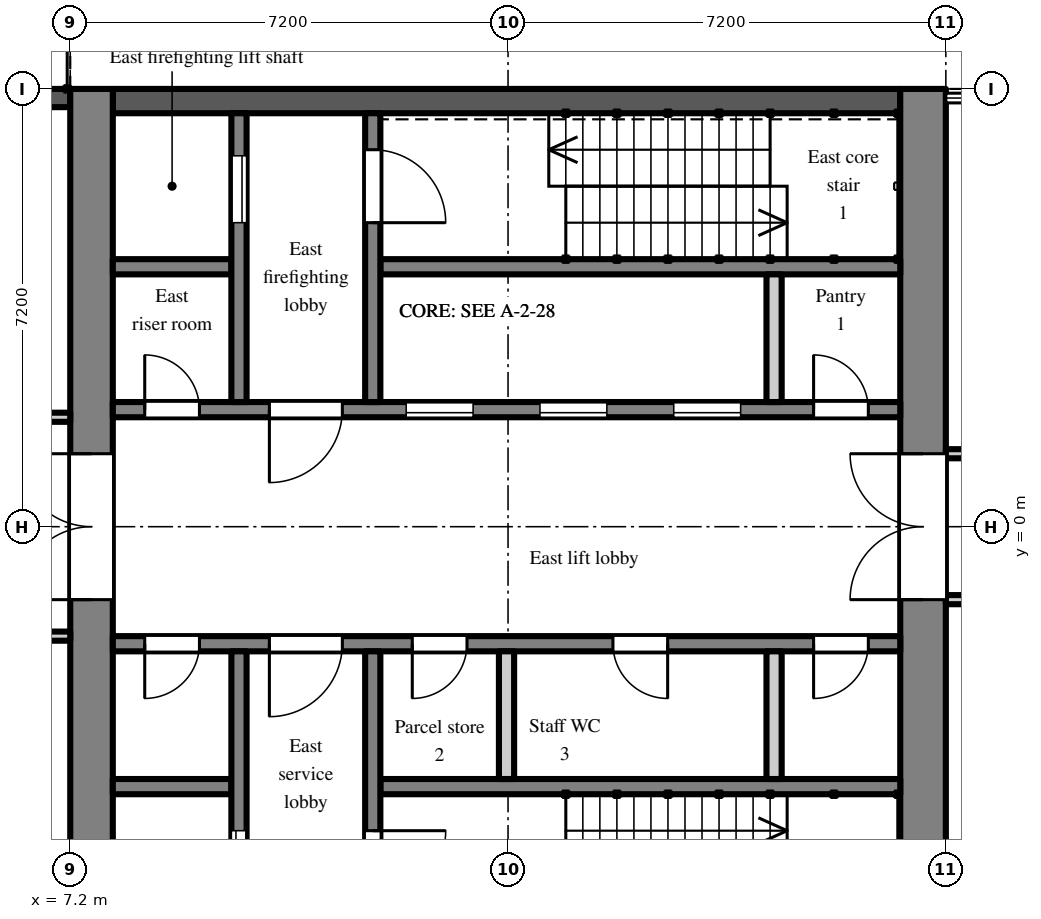
"""IFC4 building model, lengths in metres.
Left out: names, types, materials, properties, quantities, classifications, styles, units other than length and angle.
Written with IfcOpenShell. Run it as: python <this file> out.ifc"""

import sys

from ifc_helpers import new_model, si_unit, direction, frame, frame_2d, origin, place, context, subcontext, project, spatial, rectangle, extrude, element, fill, save


model = new_model("IFC4")
c1 = context("Model", 3, precision=1e-05, world=origin(), true_north=direction((0.0, 1.0)))
c2 = subcontext(c1, "Body", "Model", "MODEL_VIEW")
j1 = project(units=[si_unit("LENGTHUNIT", "METRE"), si_unit("PLANEANGLEUNIT", "RADIAN")], contexts=[c1])
p1 = place(None, origin())
s1 = spatial("IfcSite", under=j1, at=p1, CompositionType="ELEMENT")
p2 = place(p1, origin())
s2 = spatial("IfcBuilding", under=s1, at=p2, CompositionType="ELEMENT")
p3 = place(p2, frame((0.0, 0.0, 166.5)))
s3 = spatial("IfcBuildingStorey", under=s2, at=p3, CompositionType="ELEMENT", Elevation=166.5)
p4 = place(p3, frame((7.2, 7.05, 0.0), z_axis=(0.0, 0.0, 1.0), x_axis=(-1.0, 0.0, 0.0)))
e1 = element("IfcWall", 1, at=p4, inside=s3, PredefinedType="SOLIDWALL", context=c2, shape_type="SweptSolid", body=[
    extrude(rectangle(XDim=3.0, YDim=0.3, at=frame_2d((1.5, 0.0))), origin(), (0.0, 0.0, 1.0), 3.4),
])
p5 = place(p3, frame((7.55, -7.2, 0.0), z_axis=(0.0, 0.0, 1.0), x_axis=(0.0, 1.0, 0.0)))
e2 = element("IfcWall", 2, at=p5, inside=s3, PredefinedType="SHEAR", context=c2, shape_type="SweptSolid", body=[
    extrude(rectangle(XDim=14.4, YDim=0.7, at=frame_2d((7.2, 0.0))), origin(), (0.0, 0.0, 1.0), 3.8),
])
p6 = place(p5, frame((6.0, 0.0, 0.0)))
e3 = element("IfcOpeningElement", 3, at=p6, cuts=e2, PredefinedType="OPENING", context=c2, shape_type="SweptSolid", body=[
    extrude(rectangle(XDim=2.4, YDim=2.2, at=frame_2d((1.2, 1.1))), frame((0.0, 0.36, 0.0), z_axis=(0.0, -1.0, 0.0), x_axis=(1.0, 0.0, 0.0)), (0.0, 0.0, 1.0), 0.72),
])
p7 = place(p3, frame((21.225, -7.2, 0.0), z_axis=(0.0, 0.0, 1.0), x_axis=(0.0, 1.0, 0.0)))
e4 = element("IfcWall", 4, at=p7, inside=s3, PredefinedType="SHEAR", context=c2, shape_type="SweptSolid", body=[
    extrude(rectangle(XDim=14.4, YDim=0.75, at=frame_2d((7.2, 0.0))), origin(), (0.0, 0.0, 1.0), 3.8),
])
p8 = place(p7, frame((6.0, 0.0, 0.0)))
e5 = element("IfcOpeningElement", 5, at=p8, cuts=e4, PredefinedType="OPENING", context=c2, shape_type="SweptSolid", body=[
    extrude(rectangle(XDim=2.4, YDim=2.2, at=frame_2d((1.2, 1.1))), frame((0.0, 0.385, 0.0), z_axis=(0.0, -1.0, 0.0), x_axis=(1.0, 0.0, 0.0)), (0.0, 0.0, 1.0), 0.77),
])
p9 = place(p3, frame((7.9, 7.0, 0.0), z_axis=(0.0, 0.0, 1.0), x_axis=(1.0, 0.0, 0.0)))
e6 = element("IfcWall", 6, at=p9, inside=s3, PredefinedType="SHEAR", context=c2, shape_type="SweptSolid", body=[
    extrude(rectangle(XDim=12.95, YDim=0.4, at=frame_2d((6.475, 0.0))), origin(), (0.0, 0.0, 1.0), 3.8),
])
p10 = place(p3, frame((7.9, 1.925, 0.0), z_axis=(0.0, 0.0, 1.0), x_axis=(1.0, 0.0, 0.0)))
e7 = element("IfcWall", 7, at=p10, inside=s3, PredefinedType="SHEAR", context=c2, shape_type="SweptSolid", body=[
    extrude(rectangle(XDim=12.95, YDim=0.25, at=frame_2d((6.475, 0.0))), origin(), (0.0, 0.0, 1.0), 3.8),
])
p11 = place(p10, frame((4.825, 0.0, 0.0)))
e8 = element("IfcOpeningElement", 8, at=p11, cuts=e7, PredefinedType="OPENING", context=c2, shape_type="SweptSolid", body=[
    extrude(rectangle(XDim=1.1, YDim=2.1, at=frame_2d((0.55, 1.05))), frame((0.0, 0.135, 0.0), z_axis=(0.0, -1.0, 0.0), x_axis=(1.0, 0.0, 0.0)), (0.0, 0.0, 1.0), 0.27),
])
p12 = place(p10, frame((7.025, 0.0, 0.0)))
e9 = element("IfcOpeningElement", 9, at=p12, cuts=e7, PredefinedType="OPENING", context=c2, shape_type="SweptSolid", body=[
    extrude(rectangle(XDim=1.1, YDim=2.1, at=frame_2d((0.55, 1.05))), frame((0.0, 0.135, 0.0), z_axis=(0.0, -1.0, 0.0), x_axis=(1.0, 0.0, 0.0)), (0.0, 0.0, 1.0), 0.27),
])
p13 = place(p10, frame((9.225, 0.0, 0.0)))
e10 = element("IfcOpeningElement", 10, at=p13, cuts=e7, PredefinedType="OPENING", context=c2, shape_type="SweptSolid", body=[
    extrude(rectangle(XDim=1.1, YDim=2.1, at=frame_2d((0.55, 1.05))), frame((0.0, 0.135, 0.0), z_axis=(0.0, -1.0, 0.0), x_axis=(1.0, 0.0, 0.0)), (0.0, 0.0, 1.0), 0.27),
])
p14 = place(p10, frame((0.525, 0.0, 0.0)))
e11 = element("IfcOpeningElement", 11, at=p14, cuts=e7, PredefinedType="OPENING", context=c2, shape_type="SweptSolid", body=[
    extrude(rectangle(XDim=0.9, YDim=2.1, at=frame_2d((0.45, 1.05))), frame((0.0, 0.135, 0.0), z_axis=(0.0, -1.0, 0.0), x_axis=(1.0, 0.0, 0.0)), (0.0, 0.0, 1.0), 0.27),
])
p15 = place(p10, frame((2.575, 0.0, 0.0)))
e12 = element("IfcOpeningElement", 12, at=p15, cuts=e7, PredefinedType="OPENING", context=c2, shape_type="SweptSolid", body=[
    extrude(rectangle(XDim=1.2, YDim=2.1, at=frame_2d((0.6, 1.05))), frame((0.0, 0.135, 0.0), z_axis=(0.0, -1.0, 0.0), x_axis=(1.0, 0.0, 0.0)), (0.0, 0.0, 1.0), 0.27),
])
p16 = place(p10, frame((11.525, 0.0, 0.0)))
e13 = element("IfcOpeningElement", 13, at=p16, cuts=e7, PredefinedType="OPENING", context=c2, shape_type="SweptSolid", body=[
    extrude(rectangle(XDim=0.9, YDim=2.1, at=frame_2d((0.45, 1.05))), frame((0.0, 0.135, 0.0), z_axis=(0.0, -1.0, 0.0), x_axis=(1.0, 0.0, 0.0)), (0.0, 0.0, 1.0), 0.27),
])
p17 = place(p3, frame((7.9, 4.275, 0.0), z_axis=(0.0, 0.0, 1.0), x_axis=(1.0, 0.0, 0.0)))
e14 = element("IfcWall", 14, at=p17, inside=s3, PredefinedType="SHEAR", context=c2, shape_type="SweptSolid", body=[
    extrude(rectangle(XDim=1.95, YDim=0.25, at=frame_2d((0.975, 0.0))), origin(), (0.0, 0.0, 1.0), 3.8),
])
p18 = place(p3, frame((12.3, 4.275, 0.0), z_axis=(0.0, 0.0, 1.0), x_axis=(1.0, 0.0, 0.0)))
e15 = element("IfcWall", 15, at=p18, inside=s3, PredefinedType="SHEAR", context=c2, shape_type="SweptSolid", body=[
    extrude(rectangle(XDim=8.55, YDim=0.25, at=frame_2d((4.275, 0.0))), origin(), (0.0, 0.0, 1.0), 3.8),
])
p19 = place(p3, frame((9.975, 2.05, 0.0), z_axis=(0.0, 0.0, 1.0), x_axis=(0.0, 1.0, 0.0)))
e16 = element("IfcWall", 16, at=p19, inside=s3, PredefinedType="SHEAR", context=c2, shape_type="SweptSolid", body=[
    extrude(rectangle(XDim=4.75, YDim=0.25, at=frame_2d((2.375, 0.0))), origin(), (0.0, 0.0, 1.0), 3.8),
])
p20 = place(p19, frame((2.95, 0.0, 0.0)))
e17 = element("IfcOpeningElement", 17, at=p20, cuts=e16, PredefinedType="OPENING", context=c2, shape_type="SweptSolid", body=[
    extrude(rectangle(XDim=1.1, YDim=2.1, at=frame_2d((0.55, 1.05))), frame((0.0, 0.135, 0.0), z_axis=(0.0, -1.0, 0.0), x_axis=(1.0, 0.0, 0.0)), (0.0, 0.0, 1.0), 0.27),
])
p21 = place(p3, frame((12.175, 2.05, 0.0), z_axis=(0.0, 0.0, 1.0), x_axis=(0.0, 1.0, 0.0)))
e18 = element("IfcWall", 18, at=p21, inside=s3, PredefinedType="SHEAR", context=c2, shape_type="SweptSolid", body=[
    extrude(rectangle(XDim=4.75, YDim=0.25, at=frame_2d((2.375, 0.0))), origin(), (0.0, 0.0, 1.0), 3.8),
])
p22 = place(p21, frame((2.95, 0.0, 0.0)))
e19 = element("IfcOpeningElement", 19, at=p22, cuts=e18, PredefinedType="OPENING", context=c2, shape_type="SweptSolid", body=[
    extrude(rectangle(XDim=1.2, YDim=2.1, at=frame_2d((0.6, 1.05))), frame((0.0, 0.135, 0.0), z_axis=(0.0, -1.0, 0.0), x_axis=(1.0, 0.0, 0.0)), (0.0, 0.0, 1.0), 0.27),
])
p23 = place(p3, frame((18.775, 2.05, 0.0), z_axis=(0.0, 0.0, 1.0), x_axis=(0.0, 1.0, 0.0)))
e20 = element("IfcWall", 20, at=p23, inside=s3, PredefinedType="PARTITIONING", context=c2, shape_type="SweptSolid", body=[
    extrude(rectangle(XDim=2.1, YDim=0.25, at=frame_2d((1.05, 0.0))), origin(), (0.0, 0.0, 1.0), 3.8),
])
p24 = place(p3, frame((7.9, -1.925, 0.0), z_axis=(0.0, 0.0, 1.0), x_axis=(1.0, 0.0, 0.0)))
e21 = element("IfcWall", 21, at=p24, inside=s3, PredefinedType="SHEAR", context=c2, shape_type="SweptSolid", body=[
    extrude(rectangle(XDim=12.95, YDim=0.25, at=frame_2d((6.475, 0.0))), origin(), (0.0, 0.0, 1.0), 3.8),
])
p25 = place(p24, frame((0.525, 0.0, 0.0)))
e22 = element("IfcOpeningElement", 22, at=p25, cuts=e21, PredefinedType="OPENING", context=c2, shape_type="SweptSolid", body=[
    extrude(rectangle(XDim=0.9, YDim=2.1, at=frame_2d((0.45, 1.05))), frame((0.0, 0.135, 0.0), z_axis=(0.0, -1.0, 0.0), x_axis=(1.0, 0.0, 0.0)), (0.0, 0.0, 1.0), 0.27),
])
p26 = place(p24, frame((2.575, 0.0, 0.0)))
e23 = element("IfcOpeningElement", 23, at=p26, cuts=e21, PredefinedType="OPENING", context=c2, shape_type="SweptSolid", body=[
    extrude(rectangle(XDim=1.2, YDim=2.1, at=frame_2d((0.6, 1.05))), frame((0.0, 0.135, 0.0), z_axis=(0.0, -1.0, 0.0), x_axis=(1.0, 0.0, 0.0)), (0.0, 0.0, 1.0), 0.27),
])
p27 = place(p24, frame((4.925, 0.0, 0.0)))
e24 = element("IfcOpeningElement", 24, at=p27, cuts=e21, PredefinedType="OPENING", context=c2, shape_type="SweptSolid", body=[
    extrude(rectangle(XDim=0.9, YDim=2.1, at=frame_2d((0.45, 1.05))), frame((0.0, 0.135, 0.0), z_axis=(0.0, -1.0, 0.0), x_axis=(1.0, 0.0, 0.0)), (0.0, 0.0, 1.0), 0.27),
])
p28 = place(p24, frame((8.225, 0.0, 0.0)))
e25 = element("IfcOpeningElement", 25, at=p28, cuts=e21, PredefinedType="OPENING", context=c2, shape_type="SweptSolid", body=[
    extrude(rectangle(XDim=0.9, YDim=2.1, at=frame_2d((0.45, 1.05))), frame((0.0, 0.135, 0.0), z_axis=(0.0, -1.0, 0.0), x_axis=(1.0, 0.0, 0.0)), (0.0, 0.0, 1.0), 0.27),
])
p29 = place(p24, frame((11.525, 0.0, 0.0)))
e26 = element("IfcOpeningElement", 26, at=p29, cuts=e21, PredefinedType="OPENING", context=c2, shape_type="SweptSolid", body=[
    extrude(rectangle(XDim=0.9, YDim=2.1, at=frame_2d((0.45, 1.05))), frame((0.0, 0.135, 0.0), z_axis=(0.0, -1.0, 0.0), x_axis=(1.0, 0.0, 0.0)), (0.0, 0.0, 1.0), 0.27),
])
p30 = place(p3, frame((7.9, -4.275, 0.0), z_axis=(0.0, 0.0, 1.0), x_axis=(1.0, 0.0, 0.0)))
e27 = element("IfcWall", 27, at=p30, inside=s3, PredefinedType="SHEAR", context=c2, shape_type="SweptSolid", body=[
    extrude(rectangle(XDim=1.95, YDim=0.25, at=frame_2d((0.975, 0.0))), origin(), (0.0, 0.0, 1.0), 3.8),
])
p31 = place(p3, frame((12.3, -4.275, 0.0), z_axis=(0.0, 0.0, 1.0), x_axis=(1.0, 0.0, 0.0)))
e28 = element("IfcWall", 28, at=p31, inside=s3, PredefinedType="SHEAR", context=c2, shape_type="SweptSolid", body=[
    extrude(rectangle(XDim=8.55, YDim=0.25, at=frame_2d((4.275, 0.0))), origin(), (0.0, 0.0, 1.0), 3.8),
])
p32 = place(p3, frame((9.975, -2.05, 0.0), z_axis=(0.0, 0.0, 1.0), x_axis=(0.0, -1.0, 0.0)))
e29 = element("IfcWall", 29, at=p32, inside=s3, PredefinedType="SHEAR", context=c2, shape_type="SweptSolid", body=[
    extrude(rectangle(XDim=4.75, YDim=0.25, at=frame_2d((2.375, 0.0))), origin(), (0.0, 0.0, 1.0), 3.8),
])
p33 = place(p32, frame((2.95, 0.0, 0.0)))
e30 = element("IfcOpeningElement", 30, at=p33, cuts=e29, PredefinedType="OPENING", context=c2, shape_type="SweptSolid", body=[
    extrude(rectangle(XDim=1.1, YDim=2.1, at=frame_2d((0.55, 1.05))), frame((0.0, 0.135, 0.0), z_axis=(0.0, -1.0, 0.0), x_axis=(1.0, 0.0, 0.0)), (0.0, 0.0, 1.0), 0.27),
])
p34 = place(p3, frame((12.175, -2.05, 0.0), z_axis=(0.0, 0.0, 1.0), x_axis=(0.0, -1.0, 0.0)))
e31 = element("IfcWall", 31, at=p34, inside=s3, PredefinedType="SHEAR", context=c2, shape_type="SweptSolid", body=[
    extrude(rectangle(XDim=4.75, YDim=0.25, at=frame_2d((2.375, 0.0))), origin(), (0.0, 0.0, 1.0), 3.8),
])
p35 = place(p34, frame((2.95, 0.0, 0.0)))
e32 = element("IfcOpeningElement", 32, at=p35, cuts=e31, PredefinedType="OPENING", context=c2, shape_type="SweptSolid", body=[
    extrude(rectangle(XDim=1.2, YDim=2.1, at=frame_2d((0.6, 1.05))), frame((0.0, 0.135, 0.0), z_axis=(0.0, -1.0, 0.0), x_axis=(1.0, 0.0, 0.0)), (0.0, 0.0, 1.0), 0.27),
])
for number, where, z_axis, x_axis in (
    (33, (14.375, -2.05, 0.0), (0.0, 0.0, 1.0), (0.0, -1.0, 0.0)),
    (34, (18.775, -2.05, 0.0), (0.0, 0.0, 1.0), (0.0, -1.0, 0.0)),
):
    element("IfcWall", number, at=place(p3, frame(where, z_axis=z_axis, x_axis=x_axis)), inside=s3, PredefinedType="PARTITIONING", context=c2, shape_type="SweptSolid", body=[
        extrude(rectangle(XDim=2.1, YDim=0.25, at=frame_2d((1.05, 0.0))), origin(), (0.0, 0.0, 1.0), 3.8),
    ])
p36 = place(p3, frame((1.875, -1.8, 0.0), z_axis=(0.0, 0.0, 1.0), x_axis=(1.0, 0.0, 0.0)))
e35 = element("IfcWall", 35, at=p36, inside=s3, PredefinedType="PARTITIONING", context=c2, shape_type="SweptSolid", body=[
    extrude(rectangle(XDim=5.325, YDim=0.15, at=frame_2d((2.663, 0.0))), origin(), (0.0, 0.0, 1.0), 3.8),
])
p37 = place(p36, frame((0.1, 0.0, 0.0)))
e36 = element("IfcOpeningElement", 36, at=p37, cuts=e35, PredefinedType="OPENING", context=c2, shape_type="SweptSolid", body=[
    extrude(rectangle(XDim=0.9, YDim=2.1, at=frame_2d((0.45, 1.05))), frame((0.0, 0.085, 0.0), z_axis=(0.0, -1.0, 0.0), x_axis=(1.0, 0.0, 0.0)), (0.0, 0.0, 1.0), 0.17),
])
p38 = place(p36, frame((2.875, 0.0, 0.0)))
e37 = element("IfcOpeningElement", 37, at=p38, cuts=e35, PredefinedType="OPENING", context=c2, shape_type="SweptSolid", body=[
    extrude(rectangle(XDim=1.8, YDim=2.1, at=frame_2d((0.9, 1.05))), frame((0.0, 0.085, 0.0), z_axis=(0.0, -1.0, 0.0), x_axis=(1.0, 0.0, 0.0)), (0.0, 0.0, 1.0), 0.17),
])
p39 = place(p3, frame((1.875, 1.8, 0.0), z_axis=(0.0, 0.0, 1.0), x_axis=(1.0, 0.0, 0.0)))
e38 = element("IfcWall", 38, at=p39, inside=s3, PredefinedType="PARTITIONING", context=c2, shape_type="SweptSolid", body=[
    extrude(rectangle(XDim=5.325, YDim=0.15, at=frame_2d((2.663, 0.0))), origin(), (0.0, 0.0, 1.0), 3.8),
])
p40 = place(p39, frame((3.255, 0.0, 0.0)))
e39 = element("IfcOpeningElement", 39, at=p40, cuts=e38, PredefinedType="OPENING", context=c2, shape_type="SweptSolid", body=[
    extrude(rectangle(XDim=0.9, YDim=2.1, at=frame_2d((0.45, 1.05))), frame((0.0, 0.085, 0.0), z_axis=(0.0, -1.0, 0.0), x_axis=(1.0, 0.0, 0.0)), (0.0, 0.0, 1.0), 0.17),
])
p41 = place(p3, frame((21.6, -1.2, 0.0), z_axis=(0.0, 0.0, 1.0), x_axis=(1.0, 0.0, 0.0)))
e40 = element("IfcWall", 40, at=p41, inside=s3, PredefinedType="PARTITIONING", context=c2, shape_type="SweptSolid", body=[
    extrude(rectangle(XDim=3.525, YDim=0.15, at=frame_2d((1.762, 0.0))), origin(), (0.0, 0.0, 1.0), 3.8),
])
p42 = place(p41, frame((1.35, 0.0, 0.0)))
e41 = element("IfcOpeningElement", 41, at=p42, cuts=e40, PredefinedType="OPENING", context=c2, shape_type="SweptSolid", body=[
    extrude(rectangle(XDim=0.9, YDim=2.1, at=frame_2d((0.45, 1.05))), frame((0.0, 0.085, 0.0), z_axis=(0.0, -1.0, 0.0), x_axis=(1.0, 0.0, 0.0)), (0.0, 0.0, 1.0), 0.17),
])
p43 = place(p3, frame((21.6, 1.2, 0.0), z_axis=(0.0, 0.0, 1.0), x_axis=(1.0, 0.0, 0.0)))
e42 = element("IfcWall", 42, at=p43, inside=s3, PredefinedType="PARTITIONING", context=c2, shape_type="SweptSolid", body=[
    extrude(rectangle(XDim=3.525, YDim=0.15, at=frame_2d((1.762, 0.0))), origin(), (0.0, 0.0, 1.0), 3.8),
])
p44 = place(p43, frame((1.35, 0.0, 0.0)))
e43 = element("IfcOpeningElement", 43, at=p44, cuts=e42, PredefinedType="OPENING", context=c2, shape_type="SweptSolid", body=[
    extrude(rectangle(XDim=0.9, YDim=2.1, at=frame_2d((0.45, 1.05))), frame((0.0, 0.085, 0.0), z_axis=(0.0, -1.0, 0.0), x_axis=(1.0, 0.0, 0.0)), (0.0, 0.0, 1.0), 0.17),
])
p45 = place(p11, origin())
e44 = element("IfcDoor", 44, at=p45, inside=s3, OperationType="SLIDING_TO_LEFT", PredefinedType="DOOR", context=c2, shape_type="SweptSolid", body=[
    extrude(rectangle(XDim=1.1, YDim=2.1, at=frame_2d((0.55, 1.05))), frame((0.0, 0.025, 0.0), z_axis=(0.0, -1.0, 0.0), x_axis=(1.0, 0.0, 0.0)), (0.0, 0.0, 1.0), 0.05),
])
fill(e8, e44)
p46 = place(p12, origin())
e45 = element("IfcDoor", 45, at=p46, inside=s3, OperationType="SLIDING_TO_LEFT", PredefinedType="DOOR", context=c2, shape_type="SweptSolid", body=[
    extrude(rectangle(XDim=1.1, YDim=2.1, at=frame_2d((0.55, 1.05))), frame((0.0, 0.025, 0.0), z_axis=(0.0, -1.0, 0.0), x_axis=(1.0, 0.0, 0.0)), (0.0, 0.0, 1.0), 0.05),
])
fill(e9, e45)
p47 = place(p13, origin())
e46 = element("IfcDoor", 46, at=p47, inside=s3, OperationType="SLIDING_TO_LEFT", PredefinedType="DOOR", context=c2, shape_type="SweptSolid", body=[
    extrude(rectangle(XDim=1.1, YDim=2.1, at=frame_2d((0.55, 1.05))), frame((0.0, 0.025, 0.0), z_axis=(0.0, -1.0, 0.0), x_axis=(1.0, 0.0, 0.0)), (0.0, 0.0, 1.0), 0.05),
])
fill(e10, e46)
p48 = place(p20, origin())
e47 = element("IfcDoor", 47, at=p48, inside=s3, OperationType="SLIDING_TO_LEFT", PredefinedType="DOOR", context=c2, shape_type="SweptSolid", body=[
    extrude(rectangle(XDim=1.1, YDim=2.1, at=frame_2d((0.55, 1.05))), frame((0.0, 0.025, 0.0), z_axis=(0.0, -1.0, 0.0), x_axis=(1.0, 0.0, 0.0)), (0.0, 0.0, 1.0), 0.05),
])
fill(e17, e47)
p49 = place(p33, origin())
e48 = element("IfcDoor", 48, at=p49, inside=s3, OperationType="SLIDING_TO_LEFT", PredefinedType="DOOR", context=c2, shape_type="SweptSolid", body=[
    extrude(rectangle(XDim=1.1, YDim=2.1, at=frame_2d((0.55, 1.05))), frame((0.0, 0.025, 0.0), z_axis=(0.0, -1.0, 0.0), x_axis=(1.0, 0.0, 0.0)), (0.0, 0.0, 1.0), 0.05),
])
fill(e30, e48)
p50 = place(p22, frame((1.2, 0.0, 0.0), z_axis=(0.0, 0.0, 1.0), x_axis=(-1.0, 0.0, 0.0)))
e49 = element("IfcDoor", 49, at=p50, inside=s3, OperationType="SINGLE_SWING_RIGHT", PredefinedType="DOOR", context=c2, shape_type="SweptSolid", body=[
    extrude(rectangle(XDim=1.2, YDim=2.1, at=frame_2d((0.6, 1.05))), frame((0.0, 0.025, 0.0), z_axis=(0.0, -1.0, 0.0), x_axis=(1.0, 0.0, 0.0)), (0.0, 0.0, 1.0), 0.05),
])
fill(e19, e49)
p51 = place(p35, origin())
e50 = element("IfcDoor", 50, at=p51, inside=s3, OperationType="SINGLE_SWING_LEFT", PredefinedType="DOOR", context=c2, shape_type="SweptSolid", body=[
    extrude(rectangle(XDim=1.2, YDim=2.1, at=frame_2d((0.6, 1.05))), frame((0.0, 0.025, 0.0), z_axis=(0.0, -1.0, 0.0), x_axis=(1.0, 0.0, 0.0)), (0.0, 0.0, 1.0), 0.05),
])
fill(e32, e50)
p52 = place(p14, origin())
e51 = element("IfcDoor", 51, at=p52, inside=s3, OperationType="SINGLE_SWING_LEFT", PredefinedType="DOOR", context=c2, shape_type="SweptSolid", body=[
    extrude(rectangle(XDim=0.9, YDim=2.1, at=frame_2d((0.45, 1.05))), frame((0.0, 0.025, 0.0), z_axis=(0.0, -1.0, 0.0), x_axis=(1.0, 0.0, 0.0)), (0.0, 0.0, 1.0), 0.05),
])
fill(e11, e51)
p53 = place(p25, frame((0.9, 0.0, 0.0), z_axis=(0.0, 0.0, 1.0), x_axis=(-1.0, 0.0, 0.0)))
e52 = element("IfcDoor", 52, at=p53, inside=s3, OperationType="SINGLE_SWING_RIGHT", PredefinedType="DOOR", context=c2, shape_type="SweptSolid", body=[
    extrude(rectangle(XDim=0.9, YDim=2.1, at=frame_2d((0.45, 1.05))), frame((0.0, 0.025, 0.0), z_axis=(0.0, -1.0, 0.0), x_axis=(1.0, 0.0, 0.0)), (0.0, 0.0, 1.0), 0.05),
])
fill(e22, e52)
p54 = place(p15, frame((1.2, 0.0, 0.0), z_axis=(0.0, 0.0, 1.0), x_axis=(-1.0, 0.0, 0.0)))
e53 = element("IfcDoor", 53, at=p54, inside=s3, OperationType="SINGLE_SWING_RIGHT", PredefinedType="DOOR", context=c2, shape_type="SweptSolid", body=[
    extrude(rectangle(XDim=1.2, YDim=2.1, at=frame_2d((0.6, 1.05))), frame((0.0, 0.025, 0.0), z_axis=(0.0, -1.0, 0.0), x_axis=(1.0, 0.0, 0.0)), (0.0, 0.0, 1.0), 0.05),
])
fill(e12, e53)
p55 = place(p26, frame((1.2, 0.0, 0.0), z_axis=(0.0, 0.0, 1.0), x_axis=(-1.0, 0.0, 0.0)))
e54 = element("IfcDoor", 54, at=p55, inside=s3, OperationType="SINGLE_SWING_RIGHT", PredefinedType="DOOR", context=c2, shape_type="SweptSolid", body=[
    extrude(rectangle(XDim=1.2, YDim=2.1, at=frame_2d((0.6, 1.05))), frame((0.0, 0.025, 0.0), z_axis=(0.0, -1.0, 0.0), x_axis=(1.0, 0.0, 0.0)), (0.0, 0.0, 1.0), 0.05),
])
fill(e23, e54)
p56 = place(p6, origin())
e55 = element("IfcDoor", 55, at=p56, inside=s3, OperationType="DOUBLE_DOOR_DOUBLE_SWING", PredefinedType="DOOR", context=c2, shape_type="SweptSolid", body=[
    extrude(rectangle(XDim=2.4, YDim=2.2, at=frame_2d((1.2, 1.1))), frame((0.0, 0.025, 0.0), z_axis=(0.0, -1.0, 0.0), x_axis=(1.0, 0.0, 0.0)), (0.0, 0.0, 1.0), 0.05),
])
fill(e3, e55)
p57 = place(p8, origin())
e56 = element("IfcDoor", 56, at=p57, inside=s3, OperationType="DOUBLE_DOOR_DOUBLE_SWING", PredefinedType="DOOR", context=c2, shape_type="SweptSolid", body=[
    extrude(rectangle(XDim=2.4, YDim=2.2, at=frame_2d((1.2, 1.1))), frame((0.0, 0.025, 0.0), z_axis=(0.0, -1.0, 0.0), x_axis=(1.0, 0.0, 0.0)), (0.0, 0.0, 1.0), 0.05),
])
fill(e5, e56)
p58 = place(p16, origin())
e57 = element("IfcDoor", 57, at=p58, inside=s3, OperationType="SINGLE_SWING_LEFT", PredefinedType="DOOR", context=c2, shape_type="SweptSolid", body=[
    extrude(rectangle(XDim=0.9, YDim=2.1, at=frame_2d((0.45, 1.05))), frame((0.0, 0.025, 0.0), z_axis=(0.0, -1.0, 0.0), x_axis=(1.0, 0.0, 0.0)), (0.0, 0.0, 1.0), 0.05),
])
fill(e13, e57)
p59 = place(p27, frame((0.9, 0.0, 0.0), z_axis=(0.0, 0.0, 1.0), x_axis=(-1.0, 0.0, 0.0)))
e58 = element("IfcDoor", 58, at=p59, inside=s3, OperationType="SINGLE_SWING_RIGHT", PredefinedType="DOOR", context=c2, shape_type="SweptSolid", body=[
    extrude(rectangle(XDim=0.9, YDim=2.1, at=frame_2d((0.45, 1.05))), frame((0.0, 0.025, 0.0), z_axis=(0.0, -1.0, 0.0), x_axis=(1.0, 0.0, 0.0)), (0.0, 0.0, 1.0), 0.05),
])
fill(e24, e58)
p60 = place(p28, frame((0.9, 0.0, 0.0), z_axis=(0.0, 0.0, 1.0), x_axis=(-1.0, 0.0, 0.0)))
e59 = element("IfcDoor", 59, at=p60, inside=s3, OperationType="SINGLE_SWING_LEFT", PredefinedType="DOOR", context=c2, shape_type="SweptSolid", body=[
    extrude(rectangle(XDim=0.9, YDim=2.1, at=frame_2d((0.45, 1.05))), frame((0.0, 0.025, 0.0), z_axis=(0.0, -1.0, 0.0), x_axis=(1.0, 0.0, 0.0)), (0.0, 0.0, 1.0), 0.05),
])
fill(e25, e59)
p61 = place(p29, frame((0.9, 0.0, 0.0), z_axis=(0.0, 0.0, 1.0), x_axis=(-1.0, 0.0, 0.0)))
e60 = element("IfcDoor", 60, at=p61, inside=s3, OperationType="SINGLE_SWING_RIGHT", PredefinedType="DOOR", context=c2, shape_type="SweptSolid", body=[
    extrude(rectangle(XDim=0.9, YDim=2.1, at=frame_2d((0.45, 1.05))), frame((0.0, 0.025, 0.0), z_axis=(0.0, -1.0, 0.0), x_axis=(1.0, 0.0, 0.0)), (0.0, 0.0, 1.0), 0.05),
])
fill(e26, e60)
save(model, sys.argv[1])
